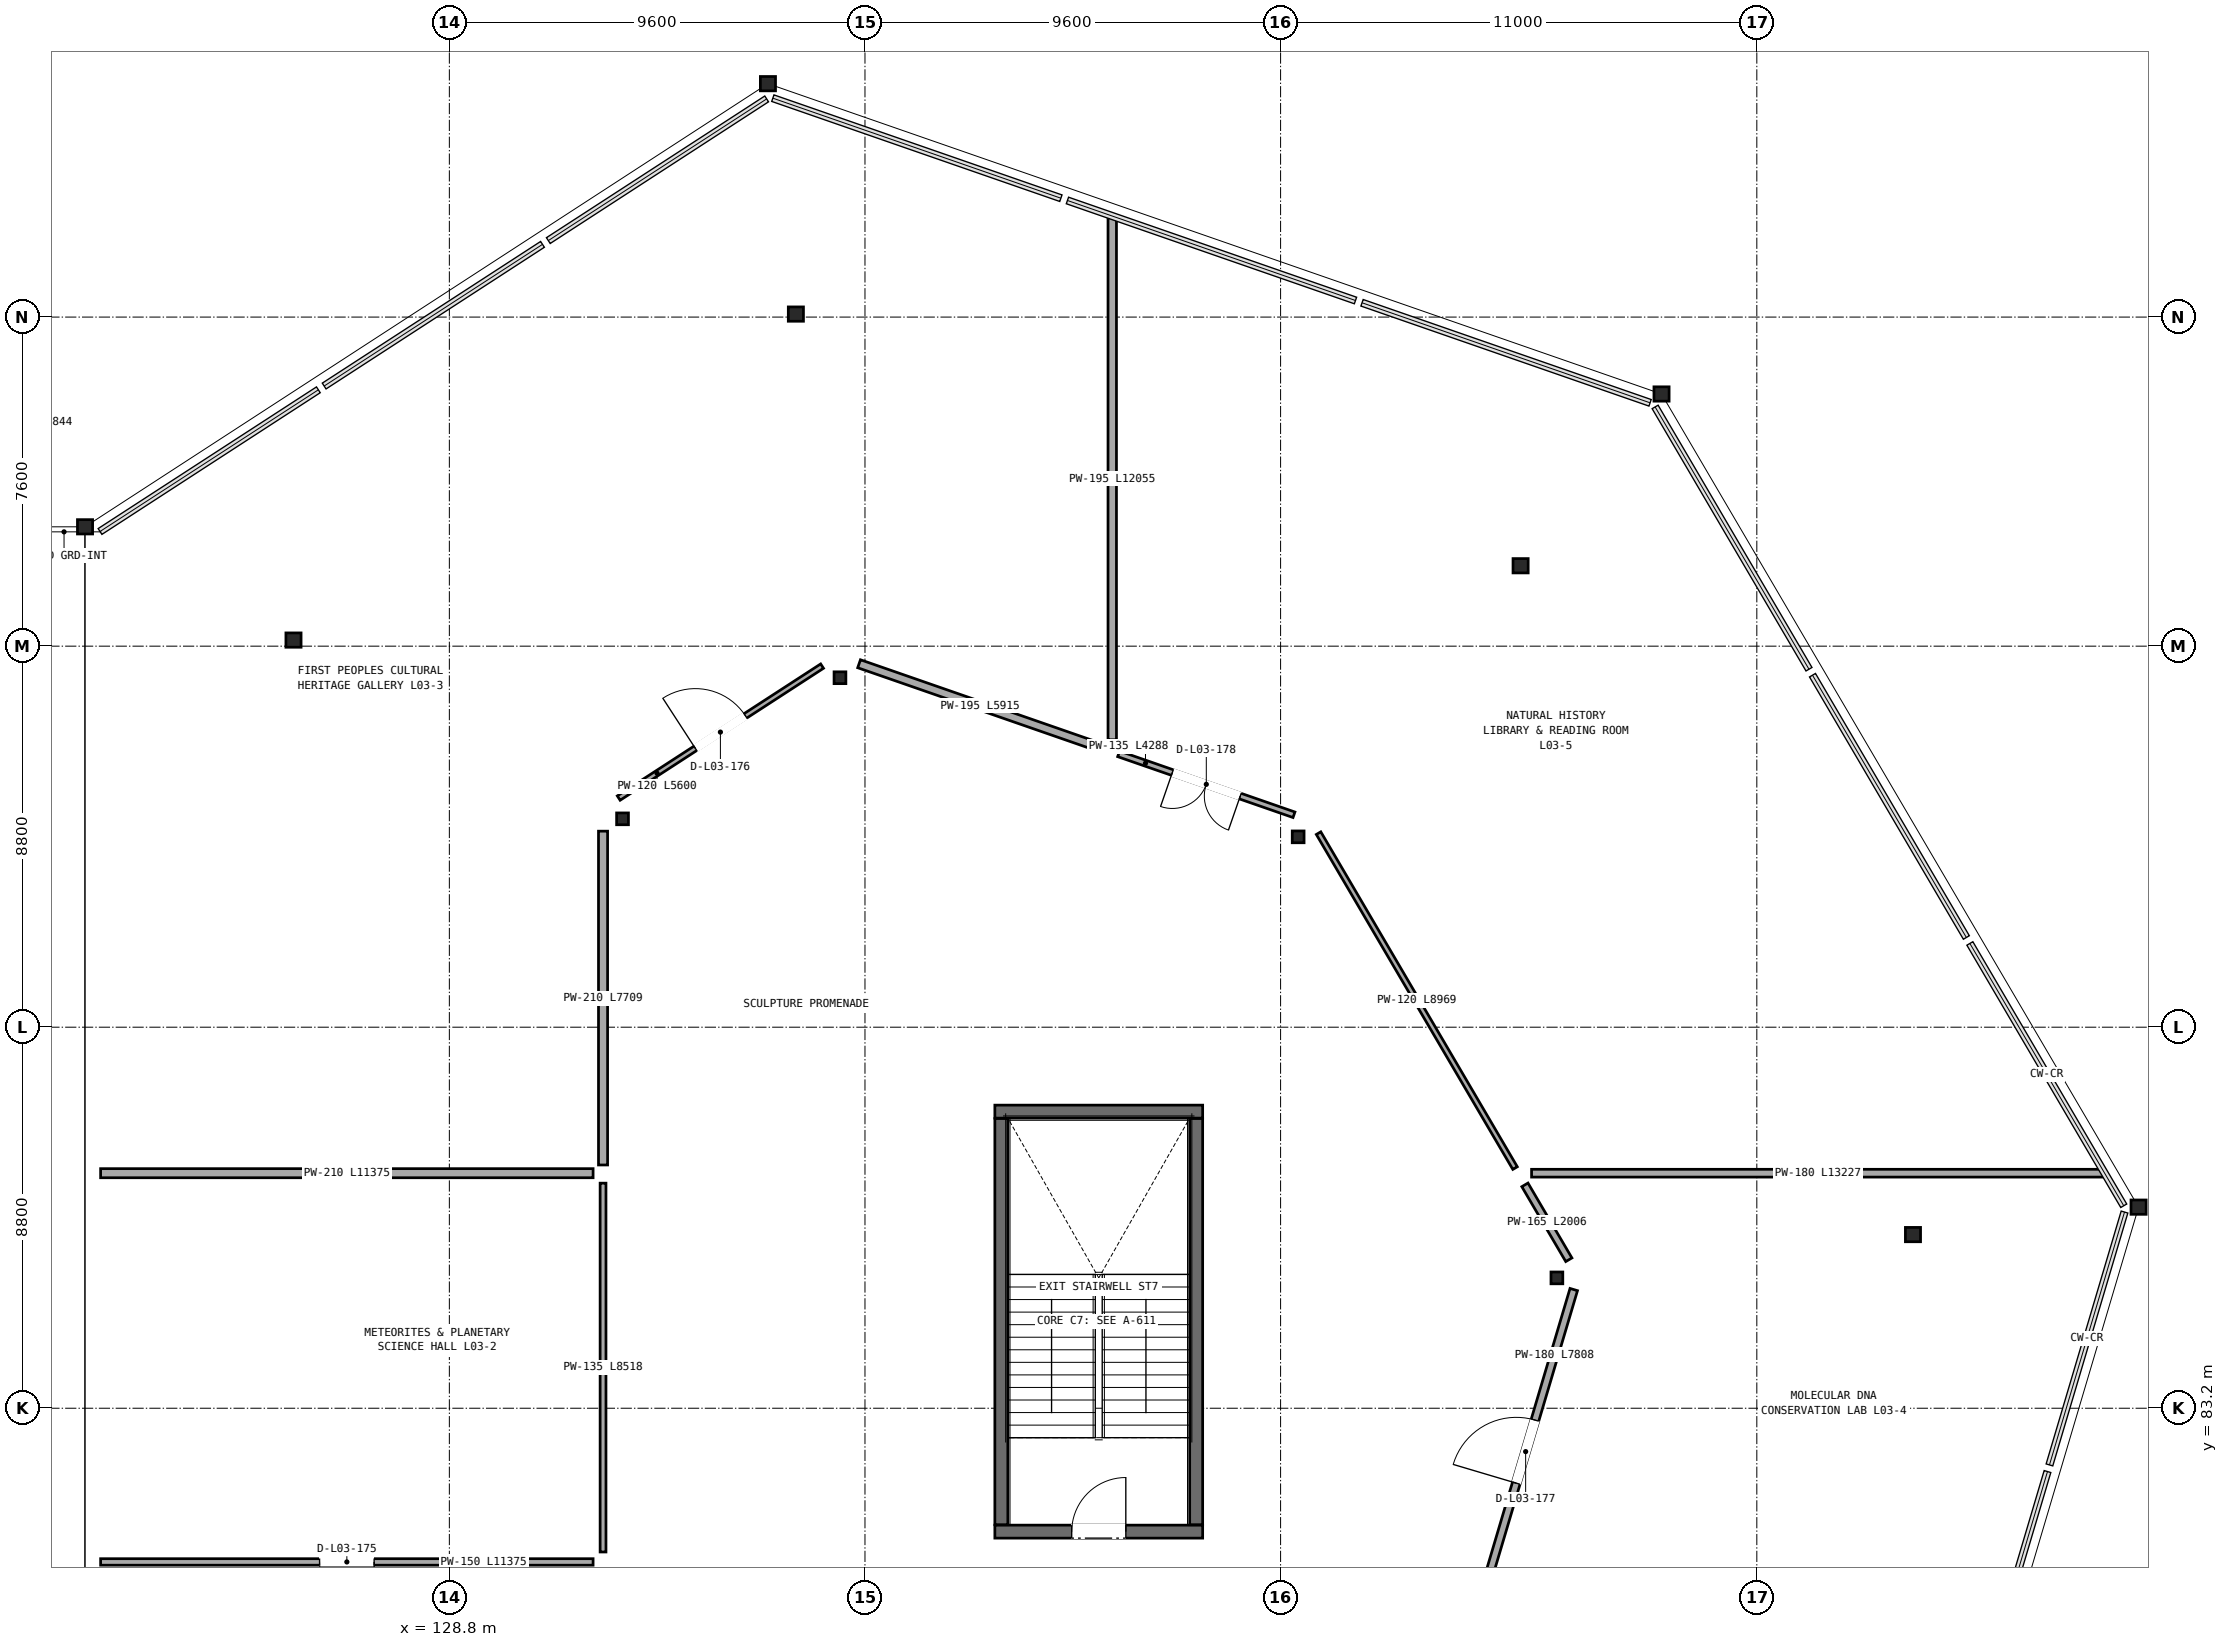
"""IFC4 building model, lengths in metres.
Left out: names, types, materials, properties, quantities, classifications, styles, units other than length and angle.
Written with IfcOpenShell. Run it as: python <this file> out.ifc"""

import sys

from ifc_helpers import new_model, si_unit, direction, frame, frame_2d, origin, origin_2d, place, context, subcontext, project, spatial, rectangle, hollow_circle, i_section, extrude, element, fill, save


model = new_model("IFC4")
c1 = context("Model", 3, precision=1e-05, world=origin(), true_north=direction((0.0, 1.0)))
c2 = subcontext(c1, "Body", "Model", "MODEL_VIEW")
j1 = project(units=[si_unit("LENGTHUNIT", "METRE"), si_unit("PLANEANGLEUNIT", "RADIAN")], contexts=[c1])
p1 = place(None, origin())
s1 = spatial("IfcSite", under=j1, at=p1, CompositionType="ELEMENT")
p2 = place(p1, origin())
s2 = spatial("IfcBuilding", under=s1, at=p2, CompositionType="ELEMENT")
p3 = place(p2, frame((0.0, 0.0, 14.6)))
s3 = spatial("IfcBuildingStorey", under=s2, at=p3, CompositionType="ELEMENT", Elevation=14.6)
p4 = place(p3, frame((167.818, 87.844, 0.0), z_axis=(-0.141024669598, -0.017131328866, 0.989857848449), x_axis=(0.12059102265, -0.992702274227, 0.0)))
e1 = element("IfcColumn", 1, at=p4, inside=s3, PredefinedType="COLUMN", context=c2, shape_type="SweptSolid", body=[
    extrude(i_section(OverallWidth=0.35, OverallDepth=0.331, WebThickness=0.02, FlangeThickness=0.028, at=origin_2d()), origin(), (0.0, 0.0, 1.0), 4.546),
])
p5 = place(p3, frame((162.607, 87.21, 0.0), z_axis=(0.0, 0.0, 1.0), x_axis=(1.0, 0.0, 0.0)))
e2 = element("IfcColumn", 2, at=p5, inside=s3, PredefinedType="COLUMN", context=c2, shape_type="SweptSolid", body=[
    extrude(i_section(OverallWidth=0.35, OverallDepth=0.331, WebThickness=0.02, FlangeThickness=0.028, at=origin_2d()), origin(), (0.0, 0.0, 1.0), 4.5),
])
p6 = place(p3, frame((154.382, 86.21, 0.0), z_axis=(0.0, 0.0, 1.0), x_axis=(1.0, 0.0, 0.0)))
e3 = element("IfcColumn", 3, at=p6, inside=s3, PredefinedType="COLUMN", context=c2, shape_type="SweptSolid", body=[
    extrude(hollow_circle(Radius=0.136, WallThickness=0.009, at=origin_2d()), origin(), (0.0, 0.0, 1.0), 4.5),
])
p7 = place(p3, frame((156.799, 106.624, 0.0), z_axis=(-0.088112945832, -0.107401084585, 0.990303547306), x_axis=(0.773112271926, -0.634269197578, 0.0)))
e4 = element("IfcColumn", 4, at=p7, inside=s3, PredefinedType="COLUMN", context=c2, shape_type="SweptSolid", body=[
    extrude(i_section(OverallWidth=0.35, OverallDepth=0.331, WebThickness=0.02, FlangeThickness=0.028, at=origin_2d()), origin(), (0.0, 0.0, 1.0), 4.544),
])
p8 = place(p3, frame((153.544, 102.657, 0.0), z_axis=(0.0, 0.0, 1.0), x_axis=(1.0, 0.0, 0.0)))
e5 = element("IfcColumn", 5, at=p8, inside=s3, PredefinedType="COLUMN", context=c2, shape_type="SweptSolid", body=[
    extrude(i_section(OverallWidth=0.35, OverallDepth=0.331, WebThickness=0.02, FlangeThickness=0.028, at=origin_2d()), origin(), (0.0, 0.0, 1.0), 4.5),
])
p9 = place(p3, frame((148.406, 96.396, 0.0), z_axis=(0.0, 0.0, 1.0), x_axis=(1.0, 0.0, 0.0)))
e6 = element("IfcColumn", 6, at=p9, inside=s3, PredefinedType="COLUMN", context=c2, shape_type="SweptSolid", body=[
    extrude(hollow_circle(Radius=0.136, WallThickness=0.009, at=origin_2d()), origin(), (0.0, 0.0, 1.0), 4.5),
])
p10 = place(p3, frame((136.159, 113.791, 0.0), z_axis=(0.017499773389, -0.143916848025, 0.989435040205), x_axis=(0.992688139413, 0.120707323181, 0.0)))
e7 = element("IfcColumn", 7, at=p10, inside=s3, PredefinedType="COLUMN", context=c2, shape_type="SweptSolid", body=[
    extrude(i_section(OverallWidth=0.35, OverallDepth=0.331, WebThickness=0.02, FlangeThickness=0.028, at=origin_2d()), origin(), (0.0, 0.0, 1.0), 4.548),
])
p11 = place(p3, frame((136.804, 108.469, 0.0), z_axis=(0.0, 0.0, 1.0), x_axis=(1.0, 0.0, 0.0)))
e8 = element("IfcColumn", 8, at=p11, inside=s3, PredefinedType="COLUMN", context=c2, shape_type="SweptSolid", body=[
    extrude(i_section(OverallWidth=0.35, OverallDepth=0.331, WebThickness=0.02, FlangeThickness=0.028, at=origin_2d()), origin(), (0.0, 0.0, 1.0), 4.5),
])
p12 = place(p3, frame((137.823, 100.071, 0.0), z_axis=(0.0, 0.0, 1.0), x_axis=(1.0, 0.0, 0.0)))
e9 = element("IfcColumn", 9, at=p12, inside=s3, PredefinedType="COLUMN", context=c2, shape_type="SweptSolid", body=[
    extrude(hollow_circle(Radius=0.136, WallThickness=0.009, at=origin_2d()), origin(), (0.0, 0.0, 1.0), 4.5),
])
p13 = place(p3, frame((120.385, 103.556, 0.0), z_axis=(0.130166770015, -0.070717148755, 0.988966984715), x_axis=(0.47737958764, 0.878697177249, 0.0)))
e10 = element("IfcColumn", 10, at=p13, inside=s3, PredefinedType="COLUMN", context=c2, shape_type="SweptSolid", body=[
    extrude(i_section(OverallWidth=0.35, OverallDepth=0.331, WebThickness=0.02, FlangeThickness=0.028, at=origin_2d()), origin(), (0.0, 0.0, 1.0), 4.55),
])
p14 = place(p3, frame((125.2, 100.941, 0.0), z_axis=(0.0, 0.0, 1.0), x_axis=(1.0, 0.0, 0.0)))
e11 = element("IfcColumn", 11, at=p14, inside=s3, PredefinedType="COLUMN", context=c2, shape_type="SweptSolid", body=[
    extrude(i_section(OverallWidth=0.35, OverallDepth=0.331, WebThickness=0.02, FlangeThickness=0.028, at=origin_2d()), origin(), (0.0, 0.0, 1.0), 4.5),
])
p15 = place(p3, frame((132.8, 96.812, 0.0), z_axis=(0.0, 0.0, 1.0), x_axis=(1.0, 0.0, 0.0)))
e12 = element("IfcColumn", 12, at=p15, inside=s3, PredefinedType="COLUMN", context=c2, shape_type="SweptSolid", body=[
    extrude(hollow_circle(Radius=0.136, WallThickness=0.009, at=origin_2d()), origin(), (0.0, 0.0, 1.0), 4.5),
])
p16 = place(p3, frame((141.4, 80.35, 0.0), z_axis=(0.0, 0.0, 1.0), x_axis=(1.0, 0.0, 0.0)))
e13 = element("IfcWall", 13, at=p16, inside=s3, PredefinedType="SHEAR", context=c2, shape_type="SweptSolid", body=[
    extrude(rectangle(XDim=4.8, YDim=0.3, at=frame_2d((2.4, 0.0))), origin(), (0.0, 0.0, 1.0), 4.235),
])
p17 = place(p16, frame((1.775, 0.0, 0.0)))
e14 = element("IfcOpeningElement", 14, at=p17, cuts=e13, PredefinedType="OPENING", context=c2, shape_type="SweptSolid", body=[
    extrude(rectangle(XDim=1.25, YDim=2.2, at=frame_2d((0.625, 1.1))), frame((0.0, 0.16, 0.0), z_axis=(0.0, -1.0, 0.0), x_axis=(1.0, 0.0, 0.0)), (0.0, 0.0, 1.0), 0.32),
])
p18 = place(p3, frame((146.2, 90.05, 0.0), z_axis=(0.0, 0.0, 1.0), x_axis=(-1.0, 0.0, 0.0)))
e15 = element("IfcWall", 15, at=p18, inside=s3, PredefinedType="SHEAR", context=c2, shape_type="SweptSolid", body=[
    extrude(rectangle(XDim=4.8, YDim=0.3, at=frame_2d((2.4, 0.0))), origin(), (0.0, 0.0, 1.0), 4.235),
])
for number, where, z_axis, x_axis in (
    (16, (146.05, 80.51, 0.0), (0.0, 0.0, 1.0), (0.0, 1.0, 0.0)),
    (17, (141.55, 89.89, 0.0), (0.0, 0.0, 1.0), (0.0, -1.0, 0.0)),
):
    element("IfcWall", number, at=place(p3, frame(where, z_axis=z_axis, x_axis=x_axis)), inside=s3, PredefinedType="SHEAR", context=c2, shape_type="SweptSolid", body=[
        extrude(rectangle(XDim=9.38, YDim=0.3, at=frame_2d((4.69, 0.0))), origin(), (0.0, 0.0, 1.0), 4.235),
    ])
p19 = place(p3, frame((132.12, 79.65, 0.0), z_axis=(0.0, 0.0, 1.0), x_axis=(-1.0, 0.0, 0.0)))
e18 = element("IfcWall", 18, at=p19, inside=s3, PredefinedType="PARTITIONING", context=c2, shape_type="SweptSolid", body=[
    extrude(rectangle(XDim=11.375, YDim=0.15, at=frame_2d((5.688, 0.0))), origin(), (0.0, 0.0, 1.0), 3.51),
])
p20 = place(p19, frame((5.058, 0.0, 0.0)))
e19 = element("IfcOpeningElement", 19, at=p20, cuts=e18, PredefinedType="OPENING", context=c2, shape_type="SweptSolid", body=[
    extrude(rectangle(XDim=1.26, YDim=2.34, at=frame_2d((0.63, 1.17))), frame((0.0, 0.085, 0.0), z_axis=(0.0, -1.0, 0.0), x_axis=(1.0, 0.0, 0.0)), (0.0, 0.0, 1.0), 0.17),
])
p21 = place(p3, frame((132.35, 88.398, 0.0), z_axis=(0.0, 0.0, 1.0), x_axis=(0.0, -1.0, 0.0)))
e20 = element("IfcWall", 20, at=p21, inside=s3, PredefinedType="PARTITIONING", context=c2, shape_type="SweptSolid", body=[
    extrude(rectangle(XDim=8.518, YDim=0.135, at=frame_2d((4.259, 0.0))), origin(), (0.0, 0.0, 1.0), 4.13),
])
p22 = place(p3, frame((137.409, 100.339, 0.0), z_axis=(0.0, 0.0, 1.0), x_axis=(-0.838914477988, -0.544263262238, 0.0)))
e21 = element("IfcWall", 21, at=p22, inside=s3, PredefinedType="PARTITIONING", context=c2, shape_type="SweptSolid", body=[
    extrude(rectangle(XDim=5.6, YDim=0.12, at=frame_2d((2.8, 0.0))), origin(), (0.0, 0.0, 1.0), 4.13),
])
p23 = place(p22, frame((2.11, 0.0, 0.0)))
e22 = element("IfcOpeningElement", 22, at=p23, cuts=e21, PredefinedType="OPENING", context=c2, shape_type="SweptSolid", body=[
    extrude(rectangle(XDim=1.38, YDim=2.34, at=frame_2d((0.69, 1.17))), frame((0.0, 0.07, 0.0), z_axis=(0.0, -1.0, 0.0), x_axis=(1.0, 0.0, 0.0)), (0.0, 0.0, 1.0), 0.14),
])
p24 = place(p3, frame((132.35, 96.527, 0.0), z_axis=(0.0, 0.0, 1.0), x_axis=(0.0, -1.0, 0.0)))
e23 = element("IfcWall", 23, at=p24, inside=s3, PredefinedType="PARTITIONING", context=c2, shape_type="SweptSolid", body=[
    extrude(rectangle(XDim=7.709, YDim=0.21, at=frame_2d((3.854, 0.0))), origin(), (0.0, 0.0, 1.0), 4.13),
])
p25 = place(p3, frame((143.852, 98.453, 0.0), z_axis=(0.0, 0.0, 1.0), x_axis=(-0.944668157892, 0.328027546809, 0.0)))
e24 = element("IfcWall", 24, at=p25, inside=s3, PredefinedType="PARTITIONING", context=c2, shape_type="SweptSolid", body=[
    extrude(rectangle(XDim=5.916, YDim=0.195, at=frame_2d((2.958, 0.0))), origin(), (0.0, 0.0, 1.0), 4.13),
])
p26 = place(p3, frame((152.549, 78.456, 0.0), z_axis=(0.0, 0.0, 1.0), x_axis=(0.284584370511, 0.958650998049, 0.0)))
e25 = element("IfcWall", 25, at=p26, inside=s3, PredefinedType="PARTITIONING", context=c2, shape_type="SweptSolid", body=[
    extrude(rectangle(XDim=7.808, YDim=0.18, at=frame_2d((3.904, 0.0))), origin(), (0.0, 0.0, 1.0), 3.41),
])
p27 = place(p26, frame((3.144, 0.0, 0.0)))
e26 = element("IfcOpeningElement", 26, at=p27, cuts=e25, PredefinedType="OPENING", context=c2, shape_type="SweptSolid", body=[
    extrude(rectangle(XDim=1.52, YDim=2.34, at=frame_2d((0.76, 1.17))), frame((0.0, 0.1, 0.0), z_axis=(0.0, -1.0, 0.0), x_axis=(1.0, 0.0, 0.0)), (0.0, 0.0, 1.0), 0.2),
])
p28 = place(p3, frame((154.658, 86.629, 0.0), z_axis=(0.0, 0.0, 1.0), x_axis=(-0.506003744629, 0.862531280837, 0.0)))
e27 = element("IfcWall", 27, at=p28, inside=s3, PredefinedType="PARTITIONING", context=c2, shape_type="SweptSolid", body=[
    extrude(rectangle(XDim=2.006, YDim=0.165, at=frame_2d((1.003, 0.0))), origin(), (0.0, 0.0, 1.0), 4.13),
])
p29 = place(p3, frame((148.309, 96.906, 0.0), z_axis=(0.0, 0.0, 1.0), x_axis=(-0.944669498392, 0.32802368635, 0.0)))
e28 = element("IfcWall", 28, at=p29, inside=s3, PredefinedType="PARTITIONING", context=c2, shape_type="SweptSolid", body=[
    extrude(rectangle(XDim=4.288, YDim=0.135, at=frame_2d((2.144, 0.0))), origin(), (0.0, 0.0, 1.0), 4.13),
])
p30 = place(p29, frame((1.314, 0.0, 0.0)))
e29 = element("IfcOpeningElement", 29, at=p30, cuts=e28, PredefinedType="OPENING", context=c2, shape_type="SweptSolid", body=[
    extrude(rectangle(XDim=1.66, YDim=2.34, at=frame_2d((0.83, 1.17))), frame((0.0, 0.078, 0.0), z_axis=(0.0, -1.0, 0.0), x_axis=(1.0, 0.0, 0.0)), (0.0, 0.0, 1.0), 0.155),
])
p31 = place(p3, frame((153.416, 88.746, 0.0), z_axis=(0.0, 0.0, 1.0), x_axis=(-0.506052681875, 0.862502569948, 0.0)))
e30 = element("IfcWall", 30, at=p31, inside=s3, PredefinedType="PARTITIONING", context=c2, shape_type="SweptSolid", body=[
    extrude(rectangle(XDim=8.969, YDim=0.12, at=frame_2d((4.484, 0.0))), origin(), (0.0, 0.0, 1.0), 3.41),
])
p32 = place(p3, frame((120.745, 88.628, 0.0), z_axis=(0.0, 0.0, 1.0), x_axis=(1.0, 0.0, 0.0)))
e31 = element("IfcWall", 31, at=p32, inside=s3, PredefinedType="PARTITIONING", context=c2, shape_type="SweptSolid", body=[
    extrude(rectangle(XDim=11.375, YDim=0.21, at=frame_2d((5.688, 0.0))), origin(), (0.0, 0.0, 1.0), 3.51),
])
p33 = place(p3, frame((144.111, 110.693, 0.0), z_axis=(0.0, 0.0, 1.0), x_axis=(0.0, -1.0, 0.0)))
e32 = element("IfcWall", 32, at=p33, inside=s3, PredefinedType="PARTITIONING", context=c2, shape_type="SweptSolid", body=[
    extrude(rectangle(XDim=12.055, YDim=0.195, at=frame_2d((6.028, 0.0))), origin(), (0.0, 0.0, 1.0), 2.75),
])
p34 = place(p3, frame((153.797, 88.628, 0.0), z_axis=(0.0, 0.0, 1.0), x_axis=(1.0, 0.0, 0.0)))
e33 = element("IfcWall", 33, at=p34, inside=s3, PredefinedType="PARTITIONING", context=c2, shape_type="SweptSolid", body=[
    extrude(rectangle(XDim=13.227, YDim=0.18, at=frame_2d((6.613, 0.0))), origin(), (0.0, 0.0, 1.0), 2.75),
])
p35 = place(p17, origin())
e34 = element("IfcDoor", 34, at=p35, inside=s3, OperationType="SINGLE_SWING_RIGHT", PredefinedType="DOOR", context=c2, shape_type="SweptSolid", body=[
    extrude(rectangle(XDim=1.25, YDim=2.2, at=frame_2d((0.625, 1.1))), frame((0.0, 0.025, 0.0), z_axis=(0.0, -1.0, 0.0), x_axis=(1.0, 0.0, 0.0)), (0.0, 0.0, 1.0), 0.05),
])
fill(e14, e34)
p36 = place(p20, origin())
e35 = element("IfcDoor", 35, at=p36, inside=s3, OperationType="SINGLE_SWING_LEFT", PredefinedType="DOOR", context=c2, shape_type="SweptSolid", body=[
    extrude(rectangle(XDim=1.26, YDim=2.34, at=frame_2d((0.63, 1.17))), frame((0.0, 0.025, 0.0), z_axis=(0.0, -1.0, 0.0), x_axis=(1.0, 0.0, 0.0)), (0.0, 0.0, 1.0), 0.05),
])
fill(e19, e35)
p37 = place(p23, frame((1.38, 0.0, 0.0), z_axis=(0.0, 0.0, 1.0), x_axis=(-1.0, 0.0, 0.0)))
e36 = element("IfcDoor", 36, at=p37, inside=s3, OperationType="SINGLE_SWING_RIGHT", PredefinedType="DOOR", context=c2, shape_type="SweptSolid", body=[
    extrude(rectangle(XDim=1.38, YDim=2.34, at=frame_2d((0.69, 1.17))), frame((0.0, 0.025, 0.0), z_axis=(0.0, -1.0, 0.0), x_axis=(1.0, 0.0, 0.0)), (0.0, 0.0, 1.0), 0.05),
])
fill(e22, e36)
p38 = place(p27, origin())
e37 = element("IfcDoor", 37, at=p38, inside=s3, OperationType="SINGLE_SWING_LEFT", PredefinedType="DOOR", context=c2, shape_type="SweptSolid", body=[
    extrude(rectangle(XDim=1.52, YDim=2.34, at=frame_2d((0.76, 1.17))), frame((0.0, 0.025, 0.0), z_axis=(0.0, -1.0, 0.0), x_axis=(1.0, 0.0, 0.0)), (0.0, 0.0, 1.0), 0.05),
])
fill(e26, e37)
p39 = place(p30, origin())
e38 = element("IfcDoor", 38, at=p39, inside=s3, OperationType="DOUBLE_DOOR_SINGLE_SWING", PredefinedType="DOOR", context=c2, shape_type="SweptSolid", body=[
    extrude(rectangle(XDim=1.66, YDim=2.34, at=frame_2d((0.83, 1.17))), frame((0.0, 0.025, 0.0), z_axis=(0.0, -1.0, 0.0), x_axis=(1.0, 0.0, 0.0)), (0.0, 0.0, 1.0), 0.05),
])
fill(e29, e38)
save(model, sys.argv[1])
